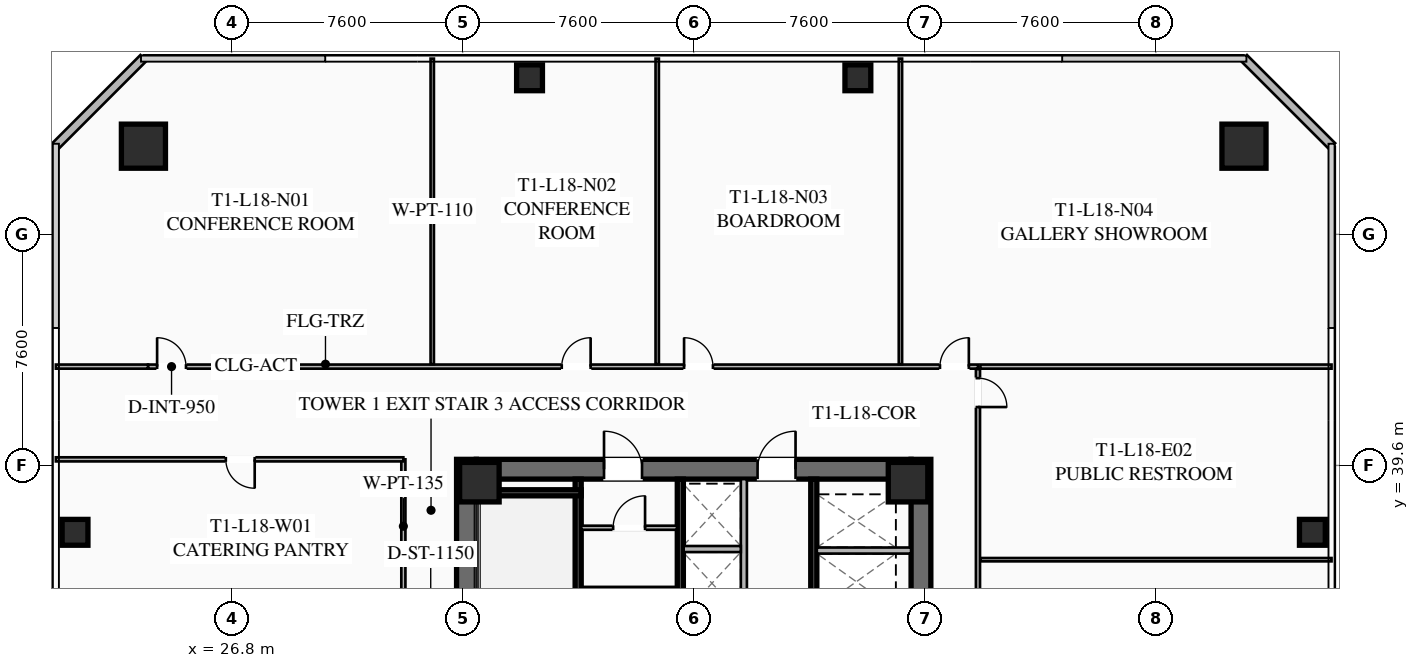
"""IFC4 building model, lengths in metres.
Left out: names, types, materials, properties, quantities, classifications, styles, units other than length and angle.
Written with IfcOpenShell. Run it as: python <this file> out.ifc"""

import sys

from ifc_helpers import new_model, si_unit, direction, frame, frame_2d, origin, origin_2d, place, context, subcontext, project, spatial, rectangle, hollow_rectangle, extrude, element, fill, save


model = new_model("IFC4")
c1 = context("Model", 3, precision=1e-05, world=origin(), true_north=direction((0.0, 1.0)))
c2 = subcontext(c1, "Body", "Model", "MODEL_VIEW")
j1 = project(units=[si_unit("LENGTHUNIT", "METRE"), si_unit("PLANEANGLEUNIT", "RADIAN")], contexts=[c1])
p1 = place(None, origin())
s1 = spatial("IfcSite", under=j1, at=p1, CompositionType="ELEMENT")
p2 = place(p1, origin())
s2 = spatial("IfcBuilding", under=s1, at=p2, CompositionType="ELEMENT")
p3 = place(p2, frame((0.0, 0.0, 70.75)))
s3 = spatial("IfcBuildingStorey", under=s2, at=p3, CompositionType="ELEMENT", Elevation=70.75)
for number, where, z_axis, x_axis in (
    (1, (34.525, 24.2, 0.0), (0.0, 0.0, 1.0), (0.0, 1.0, 0.0)),
    (2, (49.475, 39.8, 0.0), (0.0, 0.0, 1.0), (0.0, -1.0, 0.0)),
):
    element("IfcWall", number, at=place(p3, frame(where, z_axis=z_axis, x_axis=x_axis)), inside=s3, PredefinedType="SHEAR", context=c2, shape_type="SweptSolid", body=[
        extrude(rectangle(XDim=15.6, YDim=0.65, at=frame_2d((7.8, 0.0))), origin(), (0.0, 0.0, 1.0), 3.55),
    ])
p4 = place(p3, frame((34.85, 39.475, 0.0), z_axis=(0.0, 0.0, 1.0), x_axis=(1.0, 0.0, 0.0)))
e3 = element("IfcWall", 3, at=p4, inside=s3, PredefinedType="SHEAR", context=c2, shape_type="SweptSolid", body=[
    extrude(rectangle(XDim=14.3, YDim=0.65, at=frame_2d((7.15, 0.0))), origin(), (0.0, 0.0, 1.0), 3.55),
])
p5 = place(p4, frame((4.2, 0.0, 0.0)))
e4 = element("IfcOpeningElement", 4, at=p5, cuts=e3, PredefinedType="OPENING", context=c2, shape_type="SweptSolid", body=[
    extrude(rectangle(XDim=1.25, YDim=2.25, at=frame_2d((0.625, 1.125))), frame((0.0, 0.335, 0.0), z_axis=(0.0, -1.0, 0.0), x_axis=(1.0, 0.0, 0.0)), (0.0, 0.0, 1.0), 0.67),
])
p6 = place(p4, frame((9.25, 0.0, 0.0)))
e5 = element("IfcOpeningElement", 5, at=p6, cuts=e3, PredefinedType="OPENING", context=c2, shape_type="SweptSolid", body=[
    extrude(rectangle(XDim=1.25, YDim=2.25, at=frame_2d((0.625, 1.125))), frame((0.0, 0.335, 0.0), z_axis=(0.0, -1.0, 0.0), x_axis=(1.0, 0.0, 0.0)), (0.0, 0.0, 1.0), 0.67),
])
for number, where, z_axis, x_axis in (
    (6, (49.05, 39.05, 0.0), (0.0, 0.0, 1.0), (1.0, 0.0, 0.0)),
    (7, (34.95, 39.05, 0.0), (0.0, 0.0, 1.0), (1.0, 0.0, 0.0)),
):
    element("IfcColumn", number, at=place(p3, frame(where, z_axis=z_axis, x_axis=x_axis)), inside=s3, PredefinedType="COLUMN", context=c2, shape_type="SweptSolid", body=[
        extrude(hollow_rectangle(XDim=1.3, YDim=1.3, WallThickness=0.05, at=origin_2d()), origin(), (0.0, 0.0, 1.0), 3.35),
    ])
for number, where, z_axis, x_axis in (
    (8, (60.1, 50.1, 0.0), (0.0, 0.0, 1.0), (1.0, 0.0, 0.0)),
    (9, (23.9, 50.1, 0.0), (0.0, 0.0, 1.0), (1.0, 0.0, 0.0)),
):
    element("IfcColumn", number, at=place(p3, frame(where, z_axis=z_axis, x_axis=x_axis)), inside=s3, PredefinedType="COLUMN", context=c2, shape_type="SweptSolid", body=[
        extrude(hollow_rectangle(XDim=1.45, YDim=1.45, WallThickness=0.055, at=origin_2d()), origin(), (0.0, 0.0, 1.0), 3.35),
    ])
for number, where, z_axis, x_axis in (
    (10, (62.35, 37.4, 0.0), (0.0, 0.0, 1.0), (1.0, 0.0, 0.0)),
    (11, (47.4, 52.35, 0.0), (0.0, 0.0, 1.0), (1.0, 0.0, 0.0)),
    (12, (36.6, 52.35, 0.0), (0.0, 0.0, 1.0), (1.0, 0.0, 0.0)),
    (13, (21.65, 37.4, 0.0), (0.0, 0.0, 1.0), (1.0, 0.0, 0.0)),
):
    element("IfcColumn", number, at=place(p3, frame(where, z_axis=z_axis, x_axis=x_axis)), inside=s3, PredefinedType="COLUMN", context=c2, shape_type="SweptSolid", body=[
        extrude(hollow_rectangle(XDim=0.85, YDim=0.85, WallThickness=0.035, at=origin_2d()), origin(), (0.0, 0.0, 1.0), 3.35),
    ])
for number, where, z_axis, x_axis in (
    (14, (21.0, 50.1, 0.0), (0.0, 0.0, 1.0), (0.707, 0.707, 0.0)),
    (15, (60.1, 53.0, 0.0), (0.0, 0.0, 1.0), (0.707, -0.707, 0.0)),
):
    element("IfcWall", number, at=place(p3, frame(where, z_axis=z_axis, x_axis=x_axis)), inside=s3, PredefinedType="SOLIDWALL", context=c2, shape_type="SweptSolid", body=[
        extrude(rectangle(XDim=4.101, YDim=0.28, at=frame_2d((2.051, 0.0))), origin(), (0.0, 0.0, 1.0), 3.35),
    ])
p7 = place(p3, frame((38.2, 31.2, 0.0), z_axis=(0.0, 0.0, 1.0), x_axis=(0.0, 1.0, 0.0)))
e16 = element("IfcWall", 16, at=p7, inside=s3, PredefinedType="SHEAR", context=c2, shape_type="SweptSolid", body=[
    extrude(rectangle(XDim=7.95, YDim=0.2, at=frame_2d((3.975, 0.0))), origin(), (0.0, 0.0, 1.0), 3.35),
])
p8 = place(p7, frame((0.45, 0.0, 0.0)))
e17 = element("IfcOpeningElement", 17, at=p8, cuts=e16, PredefinedType="OPENING", context=c2, shape_type="SweptSolid", body=[
    extrude(rectangle(XDim=1.15, YDim=2.2, at=frame_2d((0.575, 1.1))), frame((0.0, 0.11, 0.0), z_axis=(0.0, -1.0, 0.0), x_axis=(1.0, 0.0, 0.0)), (0.0, 0.0, 1.0), 0.22),
])
p9 = place(p3, frame((34.85, 38.7, 0.0), z_axis=(0.0, 0.0, 1.0), x_axis=(1.0, 0.0, 0.0)))
e18 = element("IfcWall", 18, at=p9, inside=s3, PredefinedType="SHEAR", context=c2, shape_type="SweptSolid", body=[
    extrude(rectangle(XDim=3.45, YDim=0.2, at=frame_2d((1.725, 0.0))), origin(), (0.0, 0.0, 1.0), 3.35),
])
p10 = place(p3, frame((41.56, 24.85, 0.0), z_axis=(0.0, 0.0, 1.0), x_axis=(0.0, 1.0, 0.0)))
e19 = element("IfcWall", 19, at=p10, inside=s3, PredefinedType="SHEAR", context=c2, shape_type="SweptSolid", body=[
    extrude(rectangle(XDim=14.3, YDim=0.2, at=frame_2d((7.15, 0.0))), origin(), (0.0, 0.0, 1.0), 3.35),
])
p11 = place(p3, frame((45.95, 39.15, 0.0), z_axis=(0.0, 0.0, 1.0), x_axis=(0.0, -1.0, 0.0)))
e20 = element("IfcWall", 20, at=p11, inside=s3, PredefinedType="SHEAR", context=c2, shape_type="SweptSolid", body=[
    extrude(rectangle(XDim=6.35, YDim=0.2, at=frame_2d((3.175, 0.0))), origin(), (0.0, 0.0, 1.0), 3.35),
])
p12 = place(p3, frame((46.05, 36.8, 0.0), z_axis=(0.0, 0.0, 1.0), x_axis=(1.0, 0.0, 0.0)))
e21 = element("IfcWall", 21, at=p12, inside=s3, PredefinedType="SOLIDWALL", context=c2, shape_type="SweptSolid", body=[
    extrude(rectangle(XDim=3.1, YDim=0.2, at=frame_2d((1.55, 0.0))), origin(), (0.0, 0.0, 1.0), 3.35),
])
p13 = place(p3, frame((38.3, 37.55, 0.0), z_axis=(0.0, 0.0, 1.0), x_axis=(1.0, 0.0, 0.0)))
e22 = element("IfcWall", 22, at=p13, inside=s3, PredefinedType="PARTITIONING", context=c2, shape_type="SweptSolid", body=[
    extrude(rectangle(XDim=3.15, YDim=0.135, at=frame_2d((1.575, 0.0))), origin(), (0.0, 0.0, 1.0), 2.703),
])
p14 = place(p13, frame((1.05, 0.0, 0.0)))
e23 = element("IfcOpeningElement", 23, at=p14, cuts=e22, PredefinedType="OPENING", context=c2, shape_type="SweptSolid", body=[
    extrude(rectangle(XDim=1.05, YDim=2.2, at=frame_2d((0.525, 1.1))), frame((0.0, 0.077, 0.0), z_axis=(0.0, -1.0, 0.0), x_axis=(1.0, 0.0, 0.0)), (0.0, 0.0, 1.0), 0.155),
])
p15 = place(p3, frame((38.3, 35.55, 0.0), z_axis=(0.0, 0.0, 1.0), x_axis=(1.0, 0.0, 0.0)))
e24 = element("IfcWall", 24, at=p15, inside=s3, PredefinedType="PARTITIONING", context=c2, shape_type="SweptSolid", body=[
    extrude(rectangle(XDim=3.15, YDim=0.11, at=frame_2d((1.575, 0.0))), origin(), (0.0, 0.0, 1.0), 2.703),
])
p16 = place(p3, frame((43.65, 32.35, 0.0), z_axis=(0.0, 0.0, 1.0), x_axis=(0.0, 1.0, 0.0)))
e25 = element("IfcWall", 25, at=p16, inside=s3, PredefinedType="SOLIDWALL", context=c2, shape_type="SweptSolid", body=[
    extrude(rectangle(XDim=6.8, YDim=0.2, at=frame_2d((3.4, 0.0))), origin(), (0.0, 0.0, 1.0), 3.35),
])
p17 = place(p3, frame((41.67, 36.85, 0.0), z_axis=(0.0, 0.0, 1.0), x_axis=(1.0, 0.0, 0.0)))
e26 = element("IfcWall", 26, at=p17, inside=s3, PredefinedType="SOLIDWALL", context=c2, shape_type="SweptSolid", body=[
    extrude(rectangle(XDim=1.88, YDim=0.2, at=frame_2d((0.94, 0.0))), origin(), (0.0, 0.0, 1.0), 3.35),
])
p18 = place(p3, frame((32.45, 35.4, 0.0), z_axis=(0.0, 0.0, 1.0), x_axis=(0.0, 1.0, 0.0)))
e27 = element("IfcWall", 27, at=p18, inside=s3, PredefinedType="PARTITIONING", context=c2, shape_type="SweptSolid", body=[
    extrude(rectangle(XDim=4.4, YDim=0.135, at=frame_2d((2.2, 0.0))), origin(), (0.0, 0.0, 1.0), 2.703),
])
p19 = place(p3, frame((24.05, 42.85, 0.0), z_axis=(0.0, 0.0, 1.0), x_axis=(1.0, 0.0, 0.0)))
e28 = element("IfcWall", 28, at=p19, inside=s3, PredefinedType="PARTITIONING", context=c2, shape_type="SweptSolid", body=[
    extrude(rectangle(XDim=27.3, YDim=0.135, at=frame_2d((13.65, 0.0))), origin(), (0.0, 0.0, 1.0), 2.703),
])
p20 = place(p19, frame((0.3, 0.0, 0.0)))
e29 = element("IfcOpeningElement", 29, at=p20, cuts=e28, PredefinedType="OPENING", context=c2, shape_type="SweptSolid", body=[
    extrude(rectangle(XDim=0.95, YDim=2.05, at=frame_2d((0.475, 1.025))), frame((0.0, 0.077, 0.0), z_axis=(0.0, -1.0, 0.0), x_axis=(1.0, 0.0, 0.0)), (0.0, 0.0, 1.0), 0.155),
])
p21 = place(p19, frame((13.61, 0.0, 0.0)))
e30 = element("IfcOpeningElement", 30, at=p21, cuts=e28, PredefinedType="OPENING", context=c2, shape_type="SweptSolid", body=[
    extrude(rectangle(XDim=0.95, YDim=2.05, at=frame_2d((0.475, 1.025))), frame((0.0, 0.077, 0.0), z_axis=(0.0, -1.0, 0.0), x_axis=(1.0, 0.0, 0.0)), (0.0, 0.0, 1.0), 0.155),
])
p22 = place(p19, frame((17.633, 0.0, 0.0)))
e31 = element("IfcOpeningElement", 31, at=p22, cuts=e28, PredefinedType="OPENING", context=c2, shape_type="SweptSolid", body=[
    extrude(rectangle(XDim=0.95, YDim=2.05, at=frame_2d((0.475, 1.025))), frame((0.0, 0.077, 0.0), z_axis=(0.0, -1.0, 0.0), x_axis=(1.0, 0.0, 0.0)), (0.0, 0.0, 1.0), 0.155),
])
p23 = place(p19, frame((26.05, 0.0, 0.0)))
e32 = element("IfcOpeningElement", 32, at=p23, cuts=e28, PredefinedType="OPENING", context=c2, shape_type="SweptSolid", body=[
    extrude(rectangle(XDim=0.95, YDim=2.05, at=frame_2d((0.475, 1.025))), frame((0.0, 0.077, 0.0), z_axis=(0.0, -1.0, 0.0), x_axis=(1.0, 0.0, 0.0)), (0.0, 0.0, 1.0), 0.155),
])
p24 = place(p3, frame((21.02, 42.85, 0.0), z_axis=(0.0, 0.0, 1.0), x_axis=(1.0, 0.0, 0.0)))
e33 = element("IfcWall", 33, at=p24, inside=s3, PredefinedType="PARTITIONING", context=c2, shape_type="SweptSolid", body=[
    extrude(rectangle(XDim=3.03, YDim=0.135, at=frame_2d((1.515, 0.0))), origin(), (0.0, 0.0, 1.0), 2.703),
])
for number, where, z_axis, x_axis in (
    (34, (33.4, 42.93, 0.0), (0.0, 0.0, 1.0), (0.0, 1.0, 0.0)),
    (35, (40.8, 42.93, 0.0), (0.0, 0.0, 1.0), (0.0, 1.0, 0.0)),
    (36, (48.8, 42.93, 0.0), (0.0, 0.0, 1.0), (0.0, 1.0, 0.0)),
):
    element("IfcWall", number, at=place(p3, frame(where, z_axis=z_axis, x_axis=x_axis)), inside=s3, PredefinedType="PARTITIONING", context=c2, shape_type="SweptSolid", body=[
        extrude(rectangle(XDim=10.05, YDim=0.11, at=frame_2d((5.025, 0.0))), origin(), (0.0, 0.0, 1.0), 2.703),
    ])
p25 = place(p3, frame((51.35, 42.77, 0.0), z_axis=(0.0, 0.0, 1.0), x_axis=(0.0, -1.0, 0.0)))
e37 = element("IfcWall", 37, at=p25, inside=s3, PredefinedType="PARTITIONING", context=c2, shape_type="SweptSolid", body=[
    extrude(rectangle(XDim=20.26, YDim=0.135, at=frame_2d((10.13, 0.0))), origin(), (0.0, 0.0, 1.0), 2.703),
])
p26 = place(p25, frame((10.181, 0.0, 0.0)))
e38 = element("IfcOpeningElement", 38, at=p26, cuts=e37, PredefinedType="OPENING", context=c2, shape_type="SweptSolid", body=[
    extrude(rectangle(XDim=0.95, YDim=2.05, at=frame_2d((0.475, 1.025))), frame((0.0, 0.077, 0.0), z_axis=(0.0, -1.0, 0.0), x_axis=(1.0, 0.0, 0.0)), (0.0, 0.0, 1.0), 0.155),
])
p27 = place(p25, frame((0.3, 0.0, 0.0)))
e39 = element("IfcOpeningElement", 39, at=p27, cuts=e37, PredefinedType="OPENING", context=c2, shape_type="SweptSolid", body=[
    extrude(rectangle(XDim=0.95, YDim=2.05, at=frame_2d((0.475, 1.025))), frame((0.0, 0.077, 0.0), z_axis=(0.0, -1.0, 0.0), x_axis=(1.0, 0.0, 0.0)), (0.0, 0.0, 1.0), 0.155),
])
p28 = place(p3, frame((62.98, 42.85, 0.0), z_axis=(0.0, 0.0, 1.0), x_axis=(-1.0, 0.0, 0.0)))
e40 = element("IfcWall", 40, at=p28, inside=s3, PredefinedType="PARTITIONING", context=c2, shape_type="SweptSolid", body=[
    extrude(rectangle(XDim=11.55, YDim=0.135, at=frame_2d((5.775, 0.0))), origin(), (0.0, 0.0, 1.0), 2.703),
])
p29 = place(p3, frame((51.43, 36.5, 0.0), z_axis=(0.0, 0.0, 1.0), x_axis=(1.0, 0.0, 0.0)))
e41 = element("IfcWall", 41, at=p29, inside=s3, PredefinedType="PARTITIONING", context=c2, shape_type="SweptSolid", body=[
    extrude(rectangle(XDim=11.55, YDim=0.11, at=frame_2d((5.775, 0.0))), origin(), (0.0, 0.0, 1.0), 2.703),
])
p30 = place(p3, frame((32.45, 39.8, 0.0), z_axis=(0.0, 0.0, 1.0), x_axis=(-1.0, 0.0, 0.0)))
e42 = element("IfcWall", 42, at=p30, inside=s3, PredefinedType="PARTITIONING", context=c2, shape_type="SweptSolid", body=[
    extrude(rectangle(XDim=11.43, YDim=0.135, at=frame_2d((5.715, 0.0))), origin(), (0.0, 0.0, 1.0), 2.703),
])
p31 = place(p30, frame((4.89, 0.0, 0.0)))
e43 = element("IfcOpeningElement", 43, at=p31, cuts=e42, PredefinedType="OPENING", context=c2, shape_type="SweptSolid", body=[
    extrude(rectangle(XDim=0.95, YDim=2.05, at=frame_2d((0.475, 1.025))), frame((0.0, 0.077, 0.0), z_axis=(0.0, -1.0, 0.0), x_axis=(1.0, 0.0, 0.0)), (0.0, 0.0, 1.0), 0.155),
])
p32 = place(p5, origin())
e44 = element("IfcDoor", 44, at=p32, inside=s3, OperationType="SINGLE_SWING_LEFT", PredefinedType="DOOR", context=c2, shape_type="SweptSolid", body=[
    extrude(rectangle(XDim=1.25, YDim=2.25, at=frame_2d((0.625, 1.125))), frame((0.0, 0.025, 0.0), z_axis=(0.0, -1.0, 0.0), x_axis=(1.0, 0.0, 0.0)), (0.0, 0.0, 1.0), 0.05),
])
fill(e4, e44)
p33 = place(p6, origin())
e45 = element("IfcDoor", 45, at=p33, inside=s3, OperationType="SINGLE_SWING_RIGHT", PredefinedType="DOOR", context=c2, shape_type="SweptSolid", body=[
    extrude(rectangle(XDim=1.25, YDim=2.25, at=frame_2d((0.625, 1.125))), frame((0.0, 0.025, 0.0), z_axis=(0.0, -1.0, 0.0), x_axis=(1.0, 0.0, 0.0)), (0.0, 0.0, 1.0), 0.05),
])
fill(e5, e45)
p34 = place(p14, origin())
e46 = element("IfcDoor", 46, at=p34, inside=s3, OperationType="SINGLE_SWING_RIGHT", PredefinedType="DOOR", context=c2, shape_type="SweptSolid", body=[
    extrude(rectangle(XDim=1.05, YDim=2.2, at=frame_2d((0.525, 1.1))), frame((0.0, 0.025, 0.0), z_axis=(0.0, -1.0, 0.0), x_axis=(1.0, 0.0, 0.0)), (0.0, 0.0, 1.0), 0.05),
])
fill(e23, e46)
p35 = place(p20, origin())
e47 = element("IfcDoor", 47, at=p35, inside=s3, OperationType="SINGLE_SWING_LEFT", PredefinedType="DOOR", context=c2, shape_type="SweptSolid", body=[
    extrude(rectangle(XDim=0.95, YDim=2.05, at=frame_2d((0.475, 1.025))), frame((0.0, 0.025, 0.0), z_axis=(0.0, -1.0, 0.0), x_axis=(1.0, 0.0, 0.0)), (0.0, 0.0, 1.0), 0.05),
])
fill(e29, e47)
p36 = place(p21, origin())
e48 = element("IfcDoor", 48, at=p36, inside=s3, OperationType="SINGLE_SWING_RIGHT", PredefinedType="DOOR", context=c2, shape_type="SweptSolid", body=[
    extrude(rectangle(XDim=0.95, YDim=2.05, at=frame_2d((0.475, 1.025))), frame((0.0, 0.025, 0.0), z_axis=(0.0, -1.0, 0.0), x_axis=(1.0, 0.0, 0.0)), (0.0, 0.0, 1.0), 0.05),
])
fill(e30, e48)
p37 = place(p22, origin())
e49 = element("IfcDoor", 49, at=p37, inside=s3, OperationType="SINGLE_SWING_LEFT", PredefinedType="DOOR", context=c2, shape_type="SweptSolid", body=[
    extrude(rectangle(XDim=0.95, YDim=2.05, at=frame_2d((0.475, 1.025))), frame((0.0, 0.025, 0.0), z_axis=(0.0, -1.0, 0.0), x_axis=(1.0, 0.0, 0.0)), (0.0, 0.0, 1.0), 0.05),
])
fill(e31, e49)
p38 = place(p23, origin())
e50 = element("IfcDoor", 50, at=p38, inside=s3, OperationType="SINGLE_SWING_RIGHT", PredefinedType="DOOR", context=c2, shape_type="SweptSolid", body=[
    extrude(rectangle(XDim=0.95, YDim=2.05, at=frame_2d((0.475, 1.025))), frame((0.0, 0.025, 0.0), z_axis=(0.0, -1.0, 0.0), x_axis=(1.0, 0.0, 0.0)), (0.0, 0.0, 1.0), 0.05),
])
fill(e32, e50)
p39 = place(p27, origin())
e51 = element("IfcDoor", 51, at=p39, inside=s3, OperationType="SINGLE_SWING_RIGHT", PredefinedType="DOOR", context=c2, shape_type="SweptSolid", body=[
    extrude(rectangle(XDim=0.95, YDim=2.05, at=frame_2d((0.475, 1.025))), frame((0.0, 0.025, 0.0), z_axis=(0.0, -1.0, 0.0), x_axis=(1.0, 0.0, 0.0)), (0.0, 0.0, 1.0), 0.05),
])
fill(e39, e51)
p40 = place(p31, origin())
e52 = element("IfcDoor", 52, at=p40, inside=s3, OperationType="SINGLE_SWING_LEFT", PredefinedType="DOOR", context=c2, shape_type="SweptSolid", body=[
    extrude(rectangle(XDim=0.95, YDim=2.05, at=frame_2d((0.475, 1.025))), frame((0.0, 0.025, 0.0), z_axis=(0.0, -1.0, 0.0), x_axis=(1.0, 0.0, 0.0)), (0.0, 0.0, 1.0), 0.05),
])
fill(e43, e52)
save(model, sys.argv[1])
